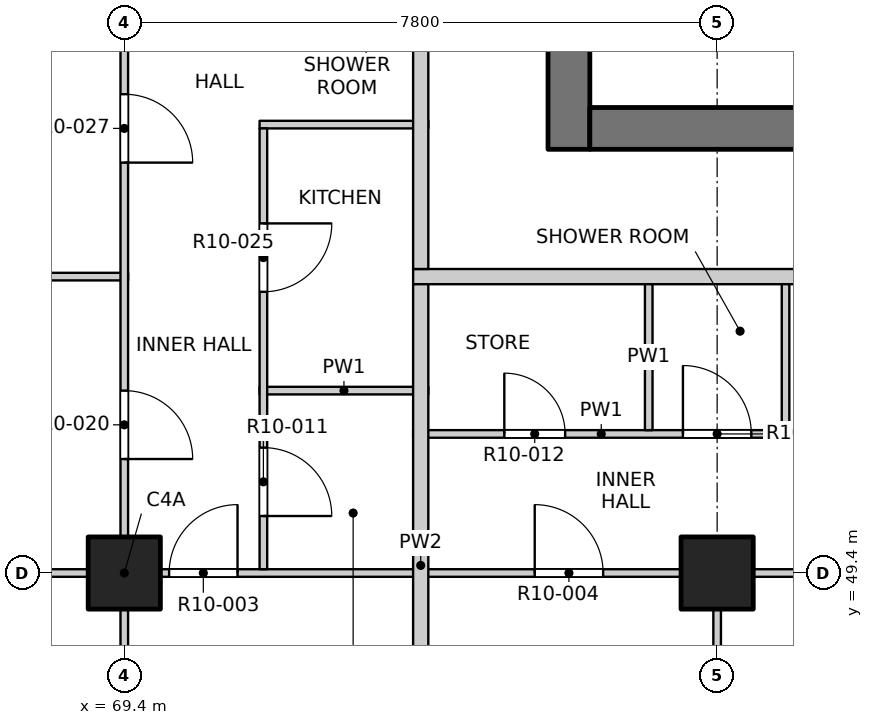
"""IFC4 building model, lengths in metres.
Left out: names, types, materials, properties, quantities, classifications, styles, units other than length and angle.
Written with IfcOpenShell. Run it as: python <this file> out.ifc"""

import sys

from ifc_helpers import new_model, si_unit, direction, frame, frame_2d, origin, origin_2d, place, context, subcontext, project, spatial, rectangle, extrude, element, fill, save


model = new_model("IFC4")
c1 = context("Model", 3, precision=1e-05, world=origin(), true_north=direction((0.0, 1.0)))
c2 = subcontext(c1, "Body", "Model", "MODEL_VIEW")
j1 = project(units=[si_unit("LENGTHUNIT", "METRE"), si_unit("PLANEANGLEUNIT", "RADIAN")], contexts=[c1])
p1 = place(None, origin())
s1 = spatial("IfcSite", under=j1, at=p1, CompositionType="ELEMENT")
p2 = place(p1, origin())
s2 = spatial("IfcBuilding", under=s1, at=p2, CompositionType="ELEMENT")
p3 = place(p2, frame((0.0, 0.0, 127.1)))
s3 = spatial("IfcBuildingStorey", under=s2, at=p3, CompositionType="ELEMENT", Elevation=127.1)
for number, where, z_axis, x_axis in (
    (1, (69.4, 49.4, -0.25), (0.0, 0.0, 1.0), (1.0, 0.0, 0.0)),
    (2, (77.2, 49.4, -0.25), (0.0, 0.0, 1.0), (1.0, 0.0, 0.0)),
):
    element("IfcColumn", number, at=place(p3, frame(where, z_axis=z_axis, x_axis=x_axis)), inside=s3, PredefinedType="COLUMN", context=c2, shape_type="SweptSolid", body=[
        extrude(rectangle(XDim=0.95, YDim=0.95, at=origin_2d()), origin(), (0.0, 0.0, 1.0), 3.4),
    ])
p4 = place(p3, frame((75.25, 54.975, -0.25), z_axis=(0.0, 0.0, 1.0), x_axis=(0.0, 1.0, 0.0)))
e3 = element("IfcWall", 3, at=p4, inside=s3, PredefinedType="SOLIDWALL", context=c2, shape_type="SweptSolid", body=[
    extrude(rectangle(XDim=22.325, YDim=0.55, at=frame_2d((11.163, 0.0))), origin(), (0.0, 0.0, 1.0), 3.4),
])
p5 = place(p4, frame((7.475, 0.0, 0.25)))
e4 = element("IfcOpeningElement", 4, at=p5, cuts=e3, PredefinedType="OPENING", context=c2, shape_type="SweptSolid", body=[
    extrude(rectangle(XDim=0.9, YDim=2.1, at=frame_2d((0.45, 1.05))), frame((0.0, 0.285, 0.0), z_axis=(0.0, -1.0, 0.0), x_axis=(1.0, 0.0, 0.0)), (0.0, 0.0, 1.0), 0.57),
])
p6 = place(p4, frame((10.775, 0.0, 0.25)))
e5 = element("IfcOpeningElement", 5, at=p6, cuts=e3, PredefinedType="OPENING", context=c2, shape_type="SweptSolid", body=[
    extrude(rectangle(XDim=0.9, YDim=2.1, at=frame_2d((0.45, 1.05))), frame((0.0, 0.285, 0.0), z_axis=(0.0, -1.0, 0.0), x_axis=(1.0, 0.0, 0.0)), (0.0, 0.0, 1.0), 0.57),
])
p7 = place(p4, frame((13.775, 0.0, 0.25)))
e6 = element("IfcOpeningElement", 6, at=p7, cuts=e3, PredefinedType="OPENING", context=c2, shape_type="SweptSolid", body=[
    extrude(rectangle(XDim=0.9, YDim=2.1, at=frame_2d((0.45, 1.05))), frame((0.0, 0.285, 0.0), z_axis=(0.0, -1.0, 0.0), x_axis=(1.0, 0.0, 0.0)), (0.0, 0.0, 1.0), 0.57),
])
p8 = place(p4, frame((16.775, 0.0, 0.25)))
e7 = element("IfcOpeningElement", 7, at=p8, cuts=e3, PredefinedType="OPENING", context=c2, shape_type="SweptSolid", body=[
    extrude(rectangle(XDim=0.9, YDim=2.1, at=frame_2d((0.45, 1.05))), frame((0.0, 0.285, 0.0), z_axis=(0.0, -1.0, 0.0), x_axis=(1.0, 0.0, 0.0)), (0.0, 0.0, 1.0), 0.57),
])
p9 = place(p4, frame((20.075, 0.0, 0.25)))
e8 = element("IfcOpeningElement", 8, at=p9, cuts=e3, PredefinedType="OPENING", context=c2, shape_type="SweptSolid", body=[
    extrude(rectangle(XDim=0.9, YDim=2.1, at=frame_2d((0.45, 1.05))), frame((0.0, 0.285, 0.0), z_axis=(0.0, -1.0, 0.0), x_axis=(1.0, 0.0, 0.0)), (0.0, 0.0, 1.0), 0.57),
])
p10 = place(p3, frame((75.525, 55.25, -0.25), z_axis=(0.0, 0.0, 1.0), x_axis=(1.0, 0.0, 0.0)))
e9 = element("IfcWall", 9, at=p10, inside=s3, PredefinedType="SOLIDWALL", context=c2, shape_type="SweptSolid", body=[
    extrude(rectangle(XDim=18.95, YDim=0.55, at=frame_2d((9.475, 0.0))), origin(), (0.0, 0.0, 1.0), 3.4),
])
p11 = place(p10, frame((8.725, 0.0, 0.25)))
e10 = element("IfcOpeningElement", 10, at=p11, cuts=e9, PredefinedType="OPENING", context=c2, shape_type="SweptSolid", body=[
    extrude(rectangle(XDim=1.5, YDim=2.1, at=frame_2d((0.75, 1.05))), frame((0.0, 0.285, 0.0), z_axis=(0.0, -1.0, 0.0), x_axis=(1.0, 0.0, 0.0)), (0.0, 0.0, 1.0), 0.57),
])
p12 = place(p3, frame((65.8, 49.4, 0.0), z_axis=(0.0, 0.0, 1.0), x_axis=(1.0, 0.0, 0.0)))
e11 = element("IfcWall", 11, at=p12, inside=s3, PredefinedType="PARTITIONING", context=c2, shape_type="SweptSolid", body=[
    extrude(rectangle(XDim=38.4, YDim=0.1, at=frame_2d((19.2, 0.0))), origin(), (0.0, 0.0, 1.0), 3.15),
])
p13 = place(p12, frame((4.19, 0.0, 0.0)))
e12 = element("IfcOpeningElement", 12, at=p13, cuts=e11, PredefinedType="OPENING", context=c2, shape_type="SweptSolid", body=[
    extrude(rectangle(XDim=0.9, YDim=2.1, at=frame_2d((0.45, 1.05))), frame((0.0, 0.06, 0.0), z_axis=(0.0, -1.0, 0.0), x_axis=(1.0, 0.0, 0.0)), (0.0, 0.0, 1.0), 0.12),
])
p14 = place(p12, frame((9.0, 0.0, 0.0)))
e13 = element("IfcOpeningElement", 13, at=p14, cuts=e11, PredefinedType="OPENING", context=c2, shape_type="SweptSolid", body=[
    extrude(rectangle(XDim=0.9, YDim=2.1, at=frame_2d((0.45, 1.05))), frame((0.0, 0.06, 0.0), z_axis=(0.0, -1.0, 0.0), x_axis=(1.0, 0.0, 0.0)), (0.0, 0.0, 1.0), 0.12),
])
p15 = place(p12, frame((12.9, 0.0, 0.0)))
e14 = element("IfcOpeningElement", 14, at=p15, cuts=e11, PredefinedType="OPENING", context=c2, shape_type="SweptSolid", body=[
    extrude(rectangle(XDim=0.9, YDim=2.1, at=frame_2d((0.45, 1.05))), frame((0.0, 0.06, 0.0), z_axis=(0.0, -1.0, 0.0), x_axis=(1.0, 0.0, 0.0)), (0.0, 0.0, 1.0), 0.12),
])
p16 = place(p12, frame((16.8, 0.0, 0.0)))
e15 = element("IfcOpeningElement", 15, at=p16, cuts=e11, PredefinedType="OPENING", context=c2, shape_type="SweptSolid", body=[
    extrude(rectangle(XDim=0.9, YDim=2.1, at=frame_2d((0.45, 1.05))), frame((0.0, 0.06, 0.0), z_axis=(0.0, -1.0, 0.0), x_axis=(1.0, 0.0, 0.0)), (0.0, 0.0, 1.0), 0.12),
])
p17 = place(p12, frame((22.5, 0.0, 0.0)))
e16 = element("IfcOpeningElement", 16, at=p17, cuts=e11, PredefinedType="OPENING", context=c2, shape_type="SweptSolid", body=[
    extrude(rectangle(XDim=1.2, YDim=2.1, at=frame_2d((0.6, 1.05))), frame((0.0, 0.06, 0.0), z_axis=(0.0, -1.0, 0.0), x_axis=(1.0, 0.0, 0.0)), (0.0, 0.0, 1.0), 0.12),
])
p18 = place(p12, frame((28.5, 0.0, 0.0)))
e17 = element("IfcOpeningElement", 17, at=p18, cuts=e11, PredefinedType="OPENING", context=c2, shape_type="SweptSolid", body=[
    extrude(rectangle(XDim=0.9, YDim=2.1, at=frame_2d((0.45, 1.05))), frame((0.0, 0.06, 0.0), z_axis=(0.0, -1.0, 0.0), x_axis=(1.0, 0.0, 0.0)), (0.0, 0.0, 1.0), 0.12),
])
p19 = place(p12, frame((33.31, 0.0, 0.0)))
e18 = element("IfcOpeningElement", 18, at=p19, cuts=e11, PredefinedType="OPENING", context=c2, shape_type="SweptSolid", body=[
    extrude(rectangle(XDim=0.9, YDim=2.1, at=frame_2d((0.45, 1.05))), frame((0.0, 0.06, 0.0), z_axis=(0.0, -1.0, 0.0), x_axis=(1.0, 0.0, 0.0)), (0.0, 0.0, 1.0), 0.12),
])
p20 = place(p3, frame((73.2, 51.23, 0.0), z_axis=(0.0, 0.0, 1.0), x_axis=(1.0, 0.0, 0.0)))
e19 = element("IfcWall", 19, at=p20, inside=s3, PredefinedType="PARTITIONING", context=c2, shape_type="SweptSolid", body=[
    extrude(rectangle(XDim=4.95, YDim=0.1, at=frame_2d((2.475, 0.0))), origin(), (0.0, 0.0, 1.0), 3.15),
])
p21 = place(p20, frame((1.2, 0.0, 0.0)))
e20 = element("IfcOpeningElement", 20, at=p21, cuts=e19, PredefinedType="OPENING", context=c2, shape_type="SweptSolid", body=[
    extrude(rectangle(XDim=0.8, YDim=2.1, at=frame_2d((0.4, 1.05))), frame((0.0, 0.06, 0.0), z_axis=(0.0, -1.0, 0.0), x_axis=(1.0, 0.0, 0.0)), (0.0, 0.0, 1.0), 0.12),
])
p22 = place(p20, frame((3.55, 0.0, 0.0)))
e21 = element("IfcOpeningElement", 21, at=p22, cuts=e19, PredefinedType="OPENING", context=c2, shape_type="SweptSolid", body=[
    extrude(rectangle(XDim=0.9, YDim=2.1, at=frame_2d((0.45, 1.05))), frame((0.0, 0.06, 0.0), z_axis=(0.0, -1.0, 0.0), x_axis=(1.0, 0.0, 0.0)), (0.0, 0.0, 1.0), 0.12),
])
p23 = place(p3, frame((71.18, 51.8, 0.0), z_axis=(0.0, 0.0, 1.0), x_axis=(1.0, 0.0, 0.0)))
e22 = element("IfcWall", 22, at=p23, inside=s3, PredefinedType="PARTITIONING", context=c2, shape_type="SweptSolid", body=[
    extrude(rectangle(XDim=2.22, YDim=0.1, at=frame_2d((1.11, 0.0))), origin(), (0.0, 0.0, 1.0), 3.15),
])
p24 = place(p3, frame((65.8, 53.3, 0.0), z_axis=(0.0, 0.0, 1.0), x_axis=(1.0, 0.0, 0.0)))
e23 = element("IfcWall", 23, at=p24, inside=s3, PredefinedType="PARTITIONING", context=c2, shape_type="SweptSolid", body=[
    extrude(rectangle(XDim=3.65, YDim=0.1, at=frame_2d((1.825, 0.0))), origin(), (0.0, 0.0, 1.0), 3.15),
])
p25 = place(p3, frame((73.2, 53.3, 0.0), z_axis=(0.0, 0.0, 1.0), x_axis=(1.0, 0.0, 0.0)))
e24 = element("IfcWall", 24, at=p25, inside=s3, PredefinedType="PARTITIONING", context=c2, shape_type="SweptSolid", body=[
    extrude(rectangle(XDim=23.6, YDim=0.2, at=frame_2d((11.8, 0.0))), origin(), (0.0, 0.0, 1.0), 3.15),
])
p26 = place(p25, frame((6.175, 0.0, 0.0)))
e25 = element("IfcOpeningElement", 25, at=p26, cuts=e24, PredefinedType="OPENING", context=c2, shape_type="SweptSolid", body=[
    extrude(rectangle(XDim=1.0, YDim=2.1, at=frame_2d((0.5, 1.05))), frame((0.0, 0.11, 0.0), z_axis=(0.0, -1.0, 0.0), x_axis=(1.0, 0.0, 0.0)), (0.0, 0.0, 1.0), 0.22),
])
p27 = place(p25, frame((18.775, 0.0, 0.0)))
e26 = element("IfcOpeningElement", 26, at=p27, cuts=e24, PredefinedType="OPENING", context=c2, shape_type="SweptSolid", body=[
    extrude(rectangle(XDim=1.0, YDim=2.1, at=frame_2d((0.5, 1.05))), frame((0.0, 0.11, 0.0), z_axis=(0.0, -1.0, 0.0), x_axis=(1.0, 0.0, 0.0)), (0.0, 0.0, 1.0), 0.22),
])
p28 = place(p3, frame((71.18, 55.3, 0.0), z_axis=(0.0, 0.0, 1.0), x_axis=(1.0, 0.0, 0.0)))
e27 = element("IfcWall", 27, at=p28, inside=s3, PredefinedType="PARTITIONING", context=c2, shape_type="SweptSolid", body=[
    extrude(rectangle(XDim=2.22, YDim=0.1, at=frame_2d((1.11, 0.0))), origin(), (0.0, 0.0, 1.0), 3.15),
])
p29 = place(p3, frame((69.4, 45.8, 0.0), z_axis=(0.0, 0.0, 1.0), x_axis=(0.0, 1.0, 0.0)))
e28 = element("IfcWall", 28, at=p29, inside=s3, PredefinedType="PARTITIONING", context=c2, shape_type="SweptSolid", body=[
    extrude(rectangle(XDim=38.4, YDim=0.1, at=frame_2d((19.2, 0.0))), origin(), (0.0, 0.0, 1.0), 3.15),
])
p30 = place(p29, frame((1.05, 0.0, 0.0)))
e29 = element("IfcOpeningElement", 29, at=p30, cuts=e28, PredefinedType="OPENING", context=c2, shape_type="SweptSolid", body=[
    extrude(rectangle(XDim=1.2, YDim=2.1, at=frame_2d((0.6, 1.05))), frame((0.0, 0.06, 0.0), z_axis=(0.0, -1.0, 0.0), x_axis=(1.0, 0.0, 0.0)), (0.0, 0.0, 1.0), 0.12),
])
p31 = place(p29, frame((5.1, 0.0, 0.0)))
e30 = element("IfcOpeningElement", 30, at=p31, cuts=e28, PredefinedType="OPENING", context=c2, shape_type="SweptSolid", body=[
    extrude(rectangle(XDim=0.9, YDim=2.1, at=frame_2d((0.45, 1.05))), frame((0.0, 0.06, 0.0), z_axis=(0.0, -1.0, 0.0), x_axis=(1.0, 0.0, 0.0)), (0.0, 0.0, 1.0), 0.12),
])
p32 = place(p29, frame((9.0, 0.0, 0.0)))
e31 = element("IfcOpeningElement", 31, at=p32, cuts=e28, PredefinedType="OPENING", context=c2, shape_type="SweptSolid", body=[
    extrude(rectangle(XDim=0.9, YDim=2.1, at=frame_2d((0.45, 1.05))), frame((0.0, 0.06, 0.0), z_axis=(0.0, -1.0, 0.0), x_axis=(1.0, 0.0, 0.0)), (0.0, 0.0, 1.0), 0.12),
])
p33 = place(p29, frame((12.9, 0.0, 0.0)))
e32 = element("IfcOpeningElement", 32, at=p33, cuts=e28, PredefinedType="OPENING", context=c2, shape_type="SweptSolid", body=[
    extrude(rectangle(XDim=0.9, YDim=2.1, at=frame_2d((0.45, 1.05))), frame((0.0, 0.06, 0.0), z_axis=(0.0, -1.0, 0.0), x_axis=(1.0, 0.0, 0.0)), (0.0, 0.0, 1.0), 0.12),
])
p34 = place(p29, frame((19.775, 0.0, 0.0)))
e33 = element("IfcOpeningElement", 33, at=p34, cuts=e28, PredefinedType="OPENING", context=c2, shape_type="SweptSolid", body=[
    extrude(rectangle(XDim=1.2, YDim=2.1, at=frame_2d((0.6, 1.05))), frame((0.0, 0.06, 0.0), z_axis=(0.0, -1.0, 0.0), x_axis=(1.0, 0.0, 0.0)), (0.0, 0.0, 1.0), 0.12),
])
p35 = place(p29, frame((24.6, 0.0, 0.0)))
e34 = element("IfcOpeningElement", 34, at=p35, cuts=e28, PredefinedType="OPENING", context=c2, shape_type="SweptSolid", body=[
    extrude(rectangle(XDim=0.9, YDim=2.1, at=frame_2d((0.45, 1.05))), frame((0.0, 0.06, 0.0), z_axis=(0.0, -1.0, 0.0), x_axis=(1.0, 0.0, 0.0)), (0.0, 0.0, 1.0), 0.12),
])
p36 = place(p29, frame((30.3, 0.0, 0.0)))
e35 = element("IfcOpeningElement", 35, at=p36, cuts=e28, PredefinedType="OPENING", context=c2, shape_type="SweptSolid", body=[
    extrude(rectangle(XDim=1.2, YDim=2.1, at=frame_2d((0.6, 1.05))), frame((0.0, 0.06, 0.0), z_axis=(0.0, -1.0, 0.0), x_axis=(1.0, 0.0, 0.0)), (0.0, 0.0, 1.0), 0.12),
])
p37 = place(p29, frame((36.15, 0.0, 0.0)))
e36 = element("IfcOpeningElement", 36, at=p37, cuts=e28, PredefinedType="OPENING", context=c2, shape_type="SweptSolid", body=[
    extrude(rectangle(XDim=1.2, YDim=2.1, at=frame_2d((0.6, 1.05))), frame((0.0, 0.06, 0.0), z_axis=(0.0, -1.0, 0.0), x_axis=(1.0, 0.0, 0.0)), (0.0, 0.0, 1.0), 0.12),
])
p38 = place(p3, frame((71.23, 49.45, 0.0), z_axis=(0.0, 0.0, 1.0), x_axis=(0.0, 1.0, 0.0)))
e37 = element("IfcWall", 37, at=p38, inside=s3, PredefinedType="PARTITIONING", context=c2, shape_type="SweptSolid", body=[
    extrude(rectangle(XDim=5.8, YDim=0.1, at=frame_2d((2.9, 0.0))), origin(), (0.0, 0.0, 1.0), 3.15),
])
p39 = place(p38, frame((0.7, 0.0, 0.0)))
e38 = element("IfcOpeningElement", 38, at=p39, cuts=e37, PredefinedType="OPENING", context=c2, shape_type="SweptSolid", body=[
    extrude(rectangle(XDim=0.9, YDim=2.1, at=frame_2d((0.45, 1.05))), frame((0.0, 0.06, 0.0), z_axis=(0.0, -1.0, 0.0), x_axis=(1.0, 0.0, 0.0)), (0.0, 0.0, 1.0), 0.12),
])
p40 = place(p38, frame((3.65, 0.0, 0.0)))
e39 = element("IfcOpeningElement", 39, at=p40, cuts=e37, PredefinedType="OPENING", context=c2, shape_type="SweptSolid", body=[
    extrude(rectangle(XDim=0.9, YDim=2.1, at=frame_2d((0.45, 1.05))), frame((0.0, 0.06, 0.0), z_axis=(0.0, -1.0, 0.0), x_axis=(1.0, 0.0, 0.0)), (0.0, 0.0, 1.0), 0.12),
])
p41 = place(p3, frame((73.3, 45.8, 0.0), z_axis=(0.0, 0.0, 1.0), x_axis=(0.0, 1.0, 0.0)))
e40 = element("IfcWall", 40, at=p41, inside=s3, PredefinedType="PARTITIONING", context=c2, shape_type="SweptSolid", body=[
    extrude(rectangle(XDim=7.4, YDim=0.2, at=frame_2d((3.7, 0.0))), origin(), (0.0, 0.0, 1.0), 3.15),
])
p42 = place(p3, frame((73.3, 53.4, 0.0), z_axis=(0.0, 0.0, 1.0), x_axis=(0.0, 1.0, 0.0)))
e41 = element("IfcWall", 41, at=p42, inside=s3, PredefinedType="PARTITIONING", context=c2, shape_type="SweptSolid", body=[
    extrude(rectangle(XDim=30.8, YDim=0.2, at=frame_2d((15.4, 0.0))), origin(), (0.0, 0.0, 1.0), 3.15),
])
p43 = place(p42, frame((3.175, 0.0, 0.0)))
e42 = element("IfcOpeningElement", 42, at=p43, cuts=e41, PredefinedType="OPENING", context=c2, shape_type="SweptSolid", body=[
    extrude(rectangle(XDim=1.0, YDim=2.1, at=frame_2d((0.5, 1.05))), frame((0.0, 0.11, 0.0), z_axis=(0.0, -1.0, 0.0), x_axis=(1.0, 0.0, 0.0)), (0.0, 0.0, 1.0), 0.22),
])
p44 = place(p42, frame((14.175, 0.0, 0.0)))
e43 = element("IfcOpeningElement", 43, at=p44, cuts=e41, PredefinedType="OPENING", context=c2, shape_type="SweptSolid", body=[
    extrude(rectangle(XDim=1.0, YDim=2.1, at=frame_2d((0.5, 1.05))), frame((0.0, 0.11, 0.0), z_axis=(0.0, -1.0, 0.0), x_axis=(1.0, 0.0, 0.0)), (0.0, 0.0, 1.0), 0.22),
])
p45 = place(p42, frame((22.425, 0.0, 0.0)))
e44 = element("IfcOpeningElement", 44, at=p45, cuts=e41, PredefinedType="OPENING", context=c2, shape_type="SweptSolid", body=[
    extrude(rectangle(XDim=1.0, YDim=2.1, at=frame_2d((0.5, 1.05))), frame((0.0, 0.11, 0.0), z_axis=(0.0, -1.0, 0.0), x_axis=(1.0, 0.0, 0.0)), (0.0, 0.0, 1.0), 0.22),
])
p46 = place(p3, frame((76.3, 51.28, 0.0), z_axis=(0.0, 0.0, 1.0), x_axis=(0.0, 1.0, 0.0)))
e45 = element("IfcWall", 45, at=p46, inside=s3, PredefinedType="PARTITIONING", context=c2, shape_type="SweptSolid", body=[
    extrude(rectangle(XDim=1.92, YDim=0.1, at=frame_2d((0.96, 0.0))), origin(), (0.0, 0.0, 1.0), 3.15),
])
p47 = place(p3, frame((77.2, 45.8, 0.0), z_axis=(0.0, 0.0, 1.0), x_axis=(0.0, 1.0, 0.0)))
e46 = element("IfcWall", 46, at=p47, inside=s3, PredefinedType="PARTITIONING", context=c2, shape_type="SweptSolid", body=[
    extrude(rectangle(XDim=3.55, YDim=0.1, at=frame_2d((1.775, 0.0))), origin(), (0.0, 0.0, 1.0), 3.15),
])
p48 = place(p3, frame((78.1, 51.28, 0.0), z_axis=(0.0, 0.0, 1.0), x_axis=(0.0, 1.0, 0.0)))
e47 = element("IfcWall", 47, at=p48, inside=s3, PredefinedType="PARTITIONING", context=c2, shape_type="SweptSolid", body=[
    extrude(rectangle(XDim=1.92, YDim=0.1, at=frame_2d((0.96, 0.0))), origin(), (0.0, 0.0, 1.0), 3.15),
])
p49 = place(p13, origin())
e48 = element("IfcDoor", 48, at=p49, inside=s3, OperationType="SINGLE_SWING_RIGHT", PredefinedType="DOOR", context=c2, shape_type="SweptSolid", body=[
    extrude(rectangle(XDim=0.9, YDim=2.1, at=frame_2d((0.45, 1.05))), frame((0.0, 0.025, 0.0), z_axis=(0.0, -1.0, 0.0), x_axis=(1.0, 0.0, 0.0)), (0.0, 0.0, 1.0), 0.05),
])
fill(e12, e48)
p50 = place(p14, origin())
e49 = element("IfcDoor", 49, at=p50, inside=s3, OperationType="SINGLE_SWING_LEFT", PredefinedType="DOOR", context=c2, shape_type="SweptSolid", body=[
    extrude(rectangle(XDim=0.9, YDim=2.1, at=frame_2d((0.45, 1.05))), frame((0.0, 0.025, 0.0), z_axis=(0.0, -1.0, 0.0), x_axis=(1.0, 0.0, 0.0)), (0.0, 0.0, 1.0), 0.05),
])
fill(e13, e49)
p51 = place(p39, origin())
e50 = element("IfcDoor", 50, at=p51, inside=s3, OperationType="SINGLE_SWING_RIGHT", PredefinedType="DOOR", context=c2, shape_type="SweptSolid", body=[
    extrude(rectangle(XDim=0.9, YDim=2.1, at=frame_2d((0.45, 1.05))), frame((0.0, 0.025, 0.0), z_axis=(0.0, -1.0, 0.0), x_axis=(1.0, 0.0, 0.0)), (0.0, 0.0, 1.0), 0.05),
])
fill(e38, e50)
p52 = place(p21, origin())
e51 = element("IfcDoor", 51, at=p52, inside=s3, OperationType="SINGLE_SWING_LEFT", PredefinedType="DOOR", context=c2, shape_type="SweptSolid", body=[
    extrude(rectangle(XDim=0.8, YDim=2.1, at=frame_2d((0.4, 1.05))), frame((0.0, 0.025, 0.0), z_axis=(0.0, -1.0, 0.0), x_axis=(1.0, 0.0, 0.0)), (0.0, 0.0, 1.0), 0.05),
])
fill(e20, e51)
p53 = place(p22, origin())
e52 = element("IfcDoor", 52, at=p53, inside=s3, OperationType="SINGLE_SWING_LEFT", PredefinedType="DOOR", context=c2, shape_type="SweptSolid", body=[
    extrude(rectangle(XDim=0.9, YDim=2.1, at=frame_2d((0.45, 1.05))), frame((0.0, 0.025, 0.0), z_axis=(0.0, -1.0, 0.0), x_axis=(1.0, 0.0, 0.0)), (0.0, 0.0, 1.0), 0.05),
])
fill(e21, e52)
p54 = place(p31, origin())
e53 = element("IfcDoor", 53, at=p54, inside=s3, OperationType="SINGLE_SWING_RIGHT", PredefinedType="DOOR", context=c2, shape_type="SweptSolid", body=[
    extrude(rectangle(XDim=0.9, YDim=2.1, at=frame_2d((0.45, 1.05))), frame((0.0, 0.025, 0.0), z_axis=(0.0, -1.0, 0.0), x_axis=(1.0, 0.0, 0.0)), (0.0, 0.0, 1.0), 0.05),
])
fill(e30, e53)
p55 = place(p40, origin())
e54 = element("IfcDoor", 54, at=p55, inside=s3, OperationType="SINGLE_SWING_LEFT", PredefinedType="DOOR", context=c2, shape_type="SweptSolid", body=[
    extrude(rectangle(XDim=0.9, YDim=2.1, at=frame_2d((0.45, 1.05))), frame((0.0, 0.025, 0.0), z_axis=(0.0, -1.0, 0.0), x_axis=(1.0, 0.0, 0.0)), (0.0, 0.0, 1.0), 0.05),
])
fill(e39, e54)
p56 = place(p32, origin())
e55 = element("IfcDoor", 55, at=p56, inside=s3, OperationType="SINGLE_SWING_RIGHT", PredefinedType="DOOR", context=c2, shape_type="SweptSolid", body=[
    extrude(rectangle(XDim=0.9, YDim=2.1, at=frame_2d((0.45, 1.05))), frame((0.0, 0.025, 0.0), z_axis=(0.0, -1.0, 0.0), x_axis=(1.0, 0.0, 0.0)), (0.0, 0.0, 1.0), 0.05),
])
fill(e31, e55)
save(model, sys.argv[1])
